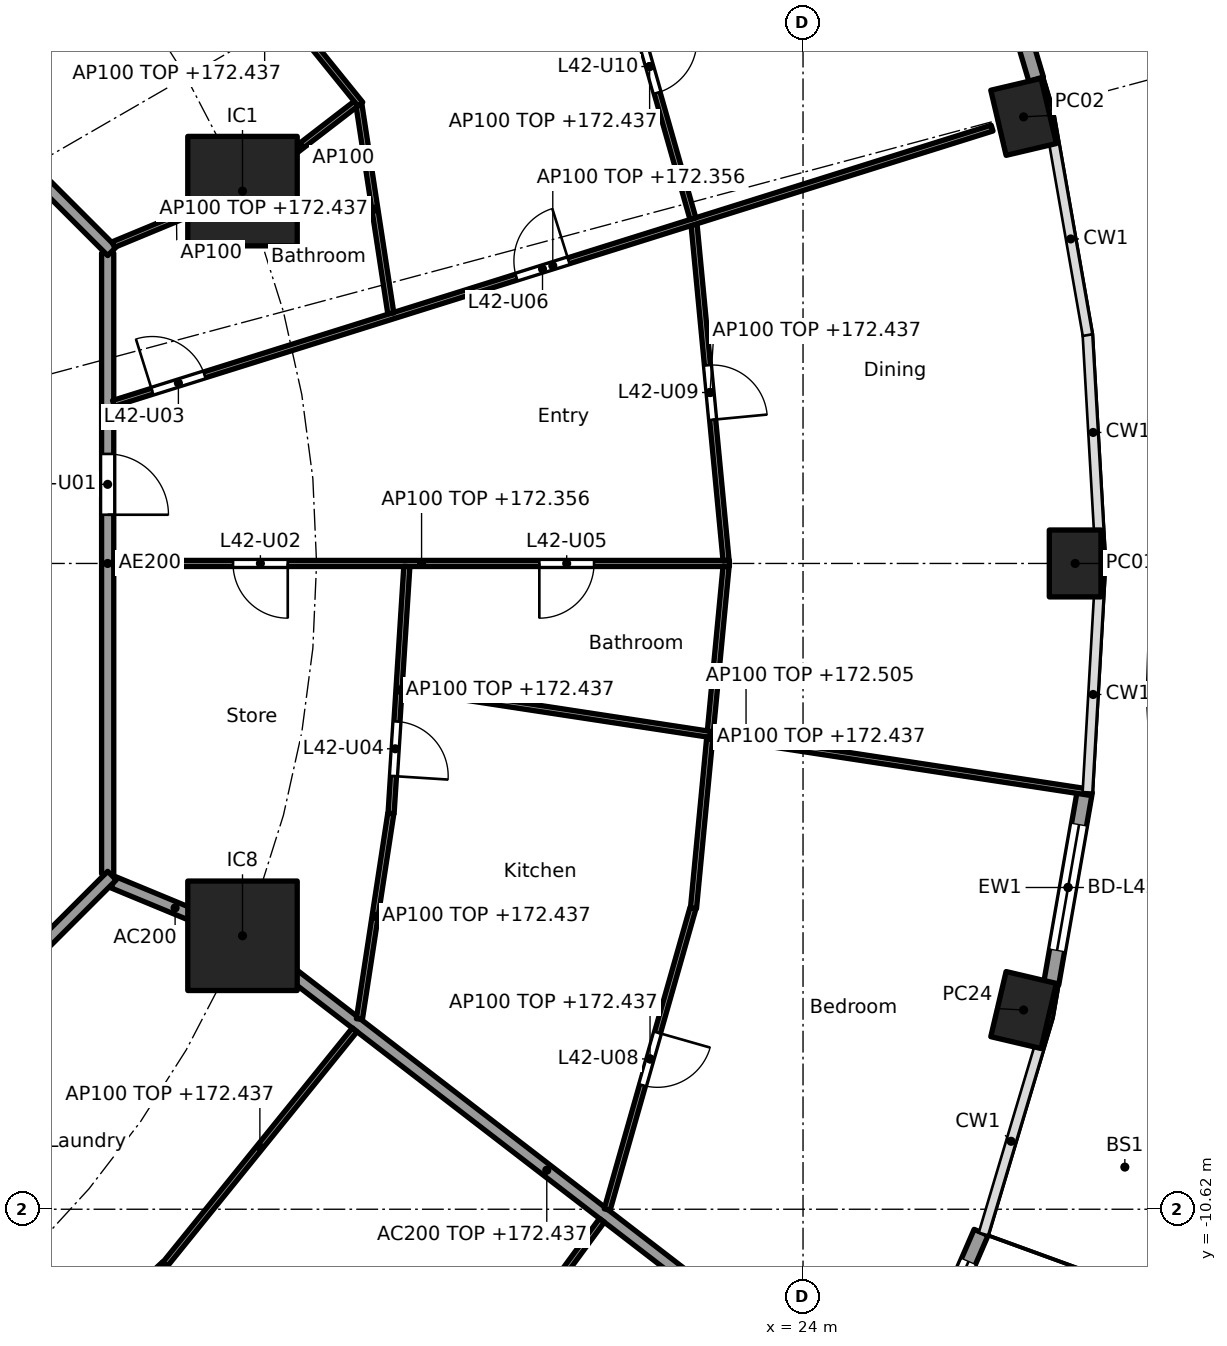
"""IFC4 building model, lengths in metres.
Left out: names, types, materials, properties, quantities, classifications, styles, units other than length and angle.
Written with IfcOpenShell. Run it as: python <this file> out.ifc"""

import sys

from ifc_helpers import new_model, si_unit, direction, frame, frame_2d, origin, origin_2d, place, context, subcontext, project, spatial, rectangle, hollow_rectangle, extrude, element, fill, save


model = new_model("IFC4")
c1 = context("Model", 3, precision=1e-05, world=origin(), true_north=direction((0.0, 1.0)))
c2 = subcontext(c1, "Body", "Model", "MODEL_VIEW")
j1 = project(units=[si_unit("LENGTHUNIT", "METRE"), si_unit("PLANEANGLEUNIT", "RADIAN")], contexts=[c1])
p1 = place(None, origin())
s1 = spatial("IfcSite", under=j1, at=p1, CompositionType="ELEMENT")
p2 = place(p1, origin())
s2 = spatial("IfcBuilding", under=s1, at=p2, CompositionType="ELEMENT")
p3 = place(p2, frame((0.0, 0.0, 169.6)))
s3 = spatial("IfcBuildingStorey", under=s2, at=p3, CompositionType="ELEMENT", Elevation=169.6)
for number, where, z_axis, x_axis in (
    (1, (28.475, 0.0, 0.0), (0.0, 0.0, 1.0), (0.0, 1.0, 0.0)),
    (2, (27.627, 7.344, 0.0), (0.0, 0.0, 1.0), (-0.229, 0.973, 0.0)),
    (3, (27.627, -7.344, 0.0), (0.0, 0.0, 1.0), (0.229, 0.973, 0.0)),
):
    element("IfcColumn", number, at=place(p3, frame(where, z_axis=z_axis, x_axis=x_axis)), inside=s3, PredefinedType="COLUMN", context=c2, shape_type="SweptSolid", body=[
        extrude(hollow_rectangle(XDim=1.1, YDim=0.85, WallThickness=0.036, at=origin_2d()), origin(), (0.0, 0.0, 1.0), 3.7),
    ])
for number, where, z_axis, x_axis in (
    (4, (14.782, 6.123, 0.0), (0.0, 0.0, 1.0), (1.0, 0.0, 0.0)),
    (5, (14.782, -6.123, 0.0), (0.0, 0.0, 1.0), (1.0, 0.0, 0.0)),
):
    element("IfcColumn", number, at=place(p3, frame(where, z_axis=z_axis, x_axis=x_axis)), inside=s3, PredefinedType="COLUMN", context=c2, shape_type="SweptSolid", body=[
        extrude(rectangle(XDim=1.8, YDim=1.8, at=origin_2d()), origin(), (0.0, 0.0, 1.0), 3.7),
    ])
p4 = place(p3, frame((26.924, 11.014, 0.0), z_axis=(0.0, 0.0, 1.0), x_axis=(0.28584838049, -0.958274857946, 0.0)))
e6 = element("IfcWall", 6, at=p4, inside=s3, PredefinedType="SOLIDWALL", context=c2, shape_type="SweptSolid", body=[
    extrude(rectangle(XDim=3.182, YDim=0.25, at=frame_2d((1.591, 0.0))), origin(), (0.0, 0.0, 1.0), 3.44),
])
p5 = place(p4, frame((0.541, 0.0, 0.0)))
e7 = element("IfcOpeningElement", 7, at=p5, cuts=e6, PredefinedType="OPENING", context=c2, shape_type="SweptSolid", body=[
    extrude(rectangle(XDim=2.1, YDim=2.4, at=frame_2d((1.05, 1.2))), frame((0.0, 0.135, 0.0), z_axis=(0.0, -1.0, 0.0), x_axis=(1.0, 0.0, 0.0)), (0.0, 0.0, 1.0), 0.27),
])
p6 = place(p3, frame((26.929, -11.0, 0.0), z_axis=(0.0, 0.0, 1.0), x_axis=(-0.397620521824, -0.917549955384, 0.0)))
e8 = element("IfcWall", 8, at=p6, inside=s3, PredefinedType="SOLIDWALL", context=c2, shape_type="SweptSolid", body=[
    extrude(rectangle(XDim=3.142, YDim=0.25, at=frame_2d((1.571, 0.0))), origin(), (0.0, 0.0, 1.0), 3.44),
])
p7 = place(p6, frame((0.521, 0.0, 0.0)))
e9 = element("IfcOpeningElement", 9, at=p7, cuts=e8, PredefinedType="OPENING", context=c2, shape_type="SweptSolid", body=[
    extrude(rectangle(XDim=2.1, YDim=2.4, at=frame_2d((1.05, 1.2))), frame((0.0, 0.135, 0.0), z_axis=(0.0, -1.0, 0.0), x_axis=(1.0, 0.0, 0.0)), (0.0, 0.0, 1.0), 0.27),
])
p8 = place(p3, frame((28.635, -3.747, 0.0), z_axis=(0.0, 0.0, 1.0), x_axis=(-0.172149769468, -0.985070787747, 0.0)))
e10 = element("IfcWall", 10, at=p8, inside=s3, PredefinedType="SOLIDWALL", context=c2, shape_type="SweptSolid", body=[
    extrude(rectangle(XDim=3.211, YDim=0.25, at=frame_2d((1.605, 0.0))), origin(), (0.0, 0.0, 1.0), 3.44),
])
p9 = place(p8, frame((0.555, 0.0, 0.0)))
e11 = element("IfcOpeningElement", 11, at=p9, cuts=e10, PredefinedType="OPENING", context=c2, shape_type="SweptSolid", body=[
    extrude(rectangle(XDim=2.1, YDim=2.4, at=frame_2d((1.05, 1.2))), frame((0.0, 0.135, 0.0), z_axis=(0.0, -1.0, 0.0), x_axis=(1.0, 0.0, 0.0)), (0.0, 0.0, 1.0), 0.27),
])
p10 = place(p3, frame((12.657, -5.243, 0.0), z_axis=(0.0, 0.0, 1.0), x_axis=(0.92383017907, -0.382802560388, 0.0)))
e12 = element("IfcWall", 12, at=p10, inside=s3, PredefinedType="PARTITIONING", context=c2, shape_type="SweptSolid", body=[
    extrude(rectangle(XDim=2.2, YDim=0.2, at=frame_2d((1.1, 0.0))), origin(), (0.0, 0.0, 1.0), 3.44),
])
p11 = place(p3, frame((14.822, -6.154, 0.0), z_axis=(0.0, 0.0, 1.0), x_axis=(0.792203056092, -0.610257583254, 0.0)))
e13 = element("IfcWall", 13, at=p11, inside=s3, PredefinedType="PARTITIONING", context=c2, shape_type="SweptSolid", body=[
    extrude(rectangle(XDim=12.533, YDim=0.2, at=frame_2d((6.266, 0.0))), origin(), (0.0, 0.0, 1.0), 2.837),
])
p12 = place(p3, frame((12.565, -5.104, 0.0), z_axis=(0.0, 0.0, 1.0), x_axis=(0.0, 1.0, 0.0)))
e14 = element("IfcWall", 14, at=p12, inside=s3, PredefinedType="PARTITIONING", context=c2, shape_type="SweptSolid", body=[
    extrude(rectangle(XDim=10.209, YDim=0.2, at=frame_2d((5.104, 0.0))), origin(), (0.0, 0.0, 1.0), 3.44),
])
p13 = place(p12, frame((5.906, 0.0, 0.0)))
e15 = element("IfcOpeningElement", 15, at=p13, cuts=e14, PredefinedType="OPENING", context=c2, shape_type="SweptSolid", body=[
    extrude(rectangle(XDim=1.0, YDim=2.1, at=frame_2d((0.5, 1.05))), frame((0.0, 0.11, 0.0), z_axis=(0.0, -1.0, 0.0), x_axis=(1.0, 0.0, 0.0)), (0.0, 0.0, 1.0), 0.22),
])
p14 = place(p3, frame((12.635, 5.134, 0.0), z_axis=(0.0, 0.0, 1.0), x_axis=(-0.707106781187, 0.707106781187, 0.0)))
e16 = element("IfcWall", 16, at=p14, inside=s3, PredefinedType="PARTITIONING", context=c2, shape_type="SweptSolid", body=[
    extrude(rectangle(XDim=10.609, YDim=0.2, at=frame_2d((5.305, 0.0))), origin(), (0.0, 0.0, 1.0), 3.44),
])
p15 = place(p3, frame((5.275, -12.494, 0.0), z_axis=(0.0, 0.0, 1.0), x_axis=(0.707106781187, 0.707106781187, 0.0)))
e17 = element("IfcWall", 17, at=p15, inside=s3, PredefinedType="PARTITIONING", context=c2, shape_type="SweptSolid", body=[
    extrude(rectangle(XDim=10.409, YDim=0.2, at=frame_2d((5.205, 0.0))), origin(), (0.0, 0.0, 1.0), 3.44),
])
p16 = place(p3, frame((12.665, 0.0, 0.0), z_axis=(0.0, 0.0, 1.0), x_axis=(1.0, 0.0, 0.0)))
e18 = element("IfcWall", 18, at=p16, inside=s3, PredefinedType="PARTITIONING", context=c2, shape_type="SweptSolid", body=[
    extrude(rectangle(XDim=10.124, YDim=0.1, at=frame_2d((5.062, 0.0))), origin(), (0.0, 0.0, 1.0), 2.756),
])
p17 = place(p16, frame((1.961, 0.0, 0.0)))
e19 = element("IfcOpeningElement", 19, at=p17, cuts=e18, PredefinedType="OPENING", context=c2, shape_type="SweptSolid", body=[
    extrude(rectangle(XDim=0.9, YDim=2.1, at=frame_2d((0.45, 1.05))), frame((0.0, 0.06, 0.0), z_axis=(0.0, -1.0, 0.0), x_axis=(1.0, 0.0, 0.0)), (0.0, 0.0, 1.0), 0.12),
])
p18 = place(p16, frame((6.999, 0.0, 0.0)))
e20 = element("IfcOpeningElement", 20, at=p18, cuts=e18, PredefinedType="OPENING", context=c2, shape_type="SweptSolid", body=[
    extrude(rectangle(XDim=0.9, YDim=2.1, at=frame_2d((0.45, 1.05))), frame((0.0, 0.06, 0.0), z_axis=(0.0, -1.0, 0.0), x_axis=(1.0, 0.0, 0.0)), (0.0, 0.0, 1.0), 0.12),
])
p19 = place(p3, frame((17.485, -0.05, 0.0), z_axis=(0.0, 0.0, 1.0), x_axis=(-0.063673473968, -0.997970785501, 0.0)))
e21 = element("IfcWall", 21, at=p19, inside=s3, PredefinedType="PARTITIONING", context=c2, shape_type="SweptSolid", body=[
    extrude(rectangle(XDim=4.072, YDim=0.1, at=frame_2d((2.036, 0.0))), origin(), (0.0, 0.0, 1.0), 2.837),
])
p20 = place(p19, frame((2.554, 0.0, 0.0)))
e22 = element("IfcOpeningElement", 22, at=p20, cuts=e21, PredefinedType="OPENING", context=c2, shape_type="SweptSolid", body=[
    extrude(rectangle(XDim=0.9, YDim=2.1, at=frame_2d((0.45, 1.05))), frame((0.0, 0.06, 0.0), z_axis=(0.0, -1.0, 0.0), x_axis=(1.0, 0.0, 0.0)), (0.0, 0.0, 1.0), 0.12),
])
p21 = place(p3, frame((22.734, 0.05, 0.0), z_axis=(0.0, 0.0, 1.0), x_axis=(-0.094923312677, 0.995484587882, 0.0)))
e23 = element("IfcWall", 23, at=p21, inside=s3, PredefinedType="PARTITIONING", context=c2, shape_type="SweptSolid", body=[
    extrude(rectangle(XDim=5.548, YDim=0.1, at=frame_2d((2.774, 0.0))), origin(), (0.0, 0.0, 1.0), 2.837),
])
p22 = place(p21, frame((2.324, 0.0, 0.0)))
e24 = element("IfcOpeningElement", 24, at=p22, cuts=e23, PredefinedType="OPENING", context=c2, shape_type="SweptSolid", body=[
    extrude(rectangle(XDim=0.9, YDim=2.1, at=frame_2d((0.45, 1.05))), frame((0.0, 0.06, 0.0), z_axis=(0.0, -1.0, 0.0), x_axis=(1.0, 0.0, 0.0)), (0.0, 0.0, 1.0), 0.12),
])
p23 = place(p3, frame((22.734, -0.05, 0.0), z_axis=(0.0, 0.0, 1.0), x_axis=(-0.0949274088, -0.995484197292, 0.0)))
e25 = element("IfcWall", 25, at=p23, inside=s3, PredefinedType="PARTITIONING", context=c2, shape_type="SweptSolid", body=[
    extrude(rectangle(XDim=5.648, YDim=0.1, at=frame_2d((2.824, 0.0))), origin(), (0.0, 0.0, 1.0), 2.837),
])
p24 = place(p3, frame((12.66, 2.632, 0.0), z_axis=(0.0, 0.0, 1.0), x_axis=(0.954248738607, 0.299013954302, 0.0)))
e26 = element("IfcWall", 26, at=p24, inside=s3, PredefinedType="PARTITIONING", context=c2, shape_type="SweptSolid", body=[
    extrude(rectangle(XDim=15.142, YDim=0.1, at=frame_2d((7.571, 0.0))), origin(), (0.0, 0.0, 1.0), 2.756),
])
p25 = place(p24, frame((0.669, 0.0, 0.0)))
e27 = element("IfcOpeningElement", 27, at=p25, cuts=e26, PredefinedType="OPENING", context=c2, shape_type="SweptSolid", body=[
    extrude(rectangle(XDim=0.9, YDim=2.1, at=frame_2d((0.45, 1.05))), frame((0.0, 0.06, 0.0), z_axis=(0.0, -1.0, 0.0), x_axis=(1.0, 0.0, 0.0)), (0.0, 0.0, 1.0), 0.12),
])
p26 = place(p24, frame((6.944, 0.0, 0.0)))
e28 = element("IfcOpeningElement", 28, at=p26, cuts=e26, PredefinedType="OPENING", context=c2, shape_type="SweptSolid", body=[
    extrude(rectangle(XDim=0.9, YDim=2.1, at=frame_2d((0.45, 1.05))), frame((0.0, 0.06, 0.0), z_axis=(0.0, -1.0, 0.0), x_axis=(1.0, 0.0, 0.0)), (0.0, 0.0, 1.0), 0.12),
])
p27 = place(p3, frame((17.221, 4.113, 0.0), z_axis=(0.0, 0.0, 1.0), x_axis=(-0.151078880423, 0.988521710379, 0.0)))
e29 = element("IfcWall", 29, at=p27, inside=s3, PredefinedType="PARTITIONING", context=c2, shape_type="SweptSolid", body=[
    extrude(rectangle(XDim=3.469, YDim=0.1, at=frame_2d((1.735, 0.0))), origin(), (0.0, 0.0, 1.0), 2.837),
])
p28 = place(p3, frame((22.189, 5.67, 0.0), z_axis=(0.0, 0.0, 1.0), x_axis=(-0.273815967041, 0.961782104322, 0.0)))
e30 = element("IfcWall", 30, at=p28, inside=s3, PredefinedType="PARTITIONING", context=c2, shape_type="SweptSolid", body=[
    extrude(rectangle(XDim=5.202, YDim=0.1, at=frame_2d((2.601, 0.0))), origin(), (0.0, 0.0, 1.0), 2.837),
])
p29 = place(p28, frame((2.151, 0.0, 0.0)))
e31 = element("IfcOpeningElement", 31, at=p29, cuts=e30, PredefinedType="OPENING", context=c2, shape_type="SweptSolid", body=[
    extrude(rectangle(XDim=0.9, YDim=2.1, at=frame_2d((0.45, 1.05))), frame((0.0, 0.06, 0.0), z_axis=(0.0, -1.0, 0.0), x_axis=(1.0, 0.0, 0.0)), (0.0, 0.0, 1.0), 0.12),
])
p30 = place(p3, frame((12.657, 5.243, 0.0), z_axis=(0.0, 0.0, 1.0), x_axis=(0.923826362943, 0.382811769845, 0.0)))
e32 = element("IfcWall", 32, at=p30, inside=s3, PredefinedType="PARTITIONING", context=c2, shape_type="SweptSolid", body=[
    extrude(rectangle(XDim=2.25, YDim=0.1, at=frame_2d((1.125, 0.0))), origin(), (0.0, 0.0, 1.0), 3.44),
])
p31 = place(p3, frame((14.822, 6.154, 0.0), z_axis=(0.0, 0.0, 1.0), x_axis=(0.792226528082, 0.610227111987, 0.0)))
e33 = element("IfcWall", 33, at=p31, inside=s3, PredefinedType="PARTITIONING", context=c2, shape_type="SweptSolid", body=[
    extrude(rectangle(XDim=2.307, YDim=0.1, at=frame_2d((1.154, 0.0))), origin(), (0.0, 0.0, 1.0), 3.44),
])
p32 = place(p3, frame((16.721, 7.553, 0.0), z_axis=(0.0, 0.0, 1.0), x_axis=(-0.628753513808, 0.777604667472, 0.0)))
e34 = element("IfcWall", 34, at=p32, inside=s3, PredefinedType="PARTITIONING", context=c2, shape_type="SweptSolid", body=[
    extrude(rectangle(XDim=5.007, YDim=0.1, at=frame_2d((2.504, 0.0))), origin(), (0.0, 0.0, 1.0), 2.837),
])
p33 = place(p32, frame((2.079, 0.0, 0.0)))
e35 = element("IfcOpeningElement", 35, at=p33, cuts=e34, PredefinedType="OPENING", context=c2, shape_type="SweptSolid", body=[
    extrude(rectangle(XDim=0.9, YDim=2.1, at=frame_2d((0.45, 1.05))), frame((0.0, 0.06, 0.0), z_axis=(0.0, -1.0, 0.0), x_axis=(1.0, 0.0, 0.0)), (0.0, 0.0, 1.0), 0.12),
])
p34 = place(p3, frame((10.21, -14.614, 0.0), z_axis=(0.0, 0.0, 1.0), x_axis=(0.728883199496, 0.684638066055, 0.0)))
e36 = element("IfcWall", 36, at=p34, inside=s3, PredefinedType="PARTITIONING", context=c2, shape_type="SweptSolid", body=[
    extrude(rectangle(XDim=4.519, YDim=0.1, at=frame_2d((2.26, 0.0))), origin(), (0.0, 0.0, 1.0), 2.837),
])
p35 = place(p3, frame((8.943, -8.966, 0.0), z_axis=(0.0, 0.0, 1.0), x_axis=(0.586803608919, -0.809729290912, 0.0)))
e37 = element("IfcWall", 37, at=p35, inside=s3, PredefinedType="PARTITIONING", context=c2, shape_type="SweptSolid", body=[
    extrude(rectangle(XDim=17.179, YDim=0.1, at=frame_2d((8.589, 0.0))), origin(), (0.0, 0.0, 1.0), 2.756),
])
p36 = place(p35, frame((2.062, 0.0, 0.0)))
e38 = element("IfcOpeningElement", 38, at=p36, cuts=e37, PredefinedType="OPENING", context=c2, shape_type="SweptSolid", body=[
    extrude(rectangle(XDim=0.9, YDim=2.1, at=frame_2d((0.45, 1.05))), frame((0.0, 0.06, 0.0), z_axis=(0.0, -1.0, 0.0), x_axis=(1.0, 0.0, 0.0)), (0.0, 0.0, 1.0), 0.12),
])
p37 = place(p35, frame((7.308, 0.0, 0.0)))
e39 = element("IfcOpeningElement", 39, at=p37, cuts=e37, PredefinedType="OPENING", context=c2, shape_type="SweptSolid", body=[
    extrude(rectangle(XDim=0.9, YDim=2.1, at=frame_2d((0.45, 1.05))), frame((0.0, 0.06, 0.0), z_axis=(0.0, -1.0, 0.0), x_axis=(1.0, 0.0, 0.0)), (0.0, 0.0, 1.0), 0.12),
])
p38 = place(p3, frame((13.509, -11.525, 0.0), z_axis=(0.0, 0.0, 1.0), x_axis=(0.628764602857, 0.777595700987, 0.0)))
e40 = element("IfcWall", 40, at=p38, inside=s3, PredefinedType="PARTITIONING", context=c2, shape_type="SweptSolid", body=[
    extrude(rectangle(XDim=4.957, YDim=0.1, at=frame_2d((2.479, 0.0))), origin(), (0.0, 0.0, 1.0), 2.837),
])
p39 = place(p3, frame((17.169, -15.609, 0.0), z_axis=(0.0, 0.0, 1.0), x_axis=(0.591122127251, 0.806582066918, 0.0)))
e41 = element("IfcWall", 41, at=p39, inside=s3, PredefinedType="PARTITIONING", context=c2, shape_type="SweptSolid", body=[
    extrude(rectangle(XDim=5.96, YDim=0.1, at=frame_2d((2.98, 0.0))), origin(), (0.0, 0.0, 1.0), 2.837),
])
p40 = place(p39, frame((2.555, 0.0, 0.0)))
e42 = element("IfcOpeningElement", 42, at=p40, cuts=e41, PredefinedType="OPENING", context=c2, shape_type="SweptSolid", body=[
    extrude(rectangle(XDim=0.9, YDim=2.1, at=frame_2d((0.45, 1.05))), frame((0.0, 0.06, 0.0), z_axis=(0.0, -1.0, 0.0), x_axis=(1.0, 0.0, 0.0)), (0.0, 0.0, 1.0), 0.12),
])
p41 = place(p3, frame((16.704, -7.493, 0.0), z_axis=(0.0, 0.0, 1.0), x_axis=(0.1510806336, 0.988521442434, 0.0)))
e43 = element("IfcWall", 43, at=p41, inside=s3, PredefinedType="PARTITIONING", context=c2, shape_type="SweptSolid", body=[
    extrude(rectangle(XDim=3.419, YDim=0.1, at=frame_2d((1.71, 0.0))), origin(), (0.0, 0.0, 1.0), 2.837),
])
p42 = place(p3, frame((20.779, -10.625, 0.0), z_axis=(0.0, 0.0, 1.0), x_axis=(0.273819702124, 0.961781040949, 0.0)))
e44 = element("IfcWall", 44, at=p42, inside=s3, PredefinedType="PARTITIONING", context=c2, shape_type="SweptSolid", body=[
    extrude(rectangle(XDim=5.152, YDim=0.1, at=frame_2d((2.576, 0.0))), origin(), (0.0, 0.0, 1.0), 2.837),
])
p43 = place(p42, frame((2.126, 0.0, 0.0)))
e45 = element("IfcOpeningElement", 45, at=p43, cuts=e44, PredefinedType="OPENING", context=c2, shape_type="SweptSolid", body=[
    extrude(rectangle(XDim=0.9, YDim=2.1, at=frame_2d((0.45, 1.05))), frame((0.0, 0.06, 0.0), z_axis=(0.0, -1.0, 0.0), x_axis=(1.0, 0.0, 0.0)), (0.0, 0.0, 1.0), 0.12),
])
p44 = place(p3, frame((17.407, -2.039, 0.0), z_axis=(0.0, 0.0, 1.0), x_axis=(0.98858728603, -0.150649188184, 0.0)))
e46 = element("IfcWall", 46, at=p44, inside=s3, PredefinedType="PARTITIONING", context=c2, shape_type="SweptSolid", body=[
    extrude(rectangle(XDim=11.441, YDim=0.1, at=frame_2d((5.721, 0.0))), origin(), (0.0, 0.0, 1.0), 2.905),
])
p45 = place(p7, origin())
e47 = element("IfcDoor", 47, at=p45, inside=s3, OperationType="SLIDING_TO_LEFT", PredefinedType="DOOR", context=c2, shape_type="SweptSolid", body=[
    extrude(rectangle(XDim=2.1, YDim=2.4, at=frame_2d((1.05, 1.2))), frame((0.0, 0.025, 0.0), z_axis=(0.0, -1.0, 0.0), x_axis=(1.0, 0.0, 0.0)), (0.0, 0.0, 1.0), 0.05),
])
fill(e9, e47)
p46 = place(p9, origin())
e48 = element("IfcDoor", 48, at=p46, inside=s3, OperationType="SLIDING_TO_LEFT", PredefinedType="DOOR", context=c2, shape_type="SweptSolid", body=[
    extrude(rectangle(XDim=2.1, YDim=2.4, at=frame_2d((1.05, 1.2))), frame((0.0, 0.025, 0.0), z_axis=(0.0, -1.0, 0.0), x_axis=(1.0, 0.0, 0.0)), (0.0, 0.0, 1.0), 0.05),
])
fill(e11, e48)
p47 = place(p13, frame((1.0, 0.0, 0.0), x_axis=(-1.0, 0.0, 0.0)))
e49 = element("IfcDoor", 49, at=p47, inside=s3, OperationType="SINGLE_SWING_RIGHT", PredefinedType="DOOR", context=c2, shape_type="SweptSolid", body=[
    extrude(rectangle(XDim=1.0, YDim=2.1, at=frame_2d((0.5, 1.05))), frame((0.0, 0.025, 0.0), z_axis=(0.0, -1.0, 0.0), x_axis=(1.0, 0.0, 0.0)), (0.0, 0.0, 1.0), 0.05),
])
fill(e15, e49)
p48 = place(p17, frame((0.9, 0.0, 0.0), x_axis=(-1.0, 0.0, 0.0)))
e50 = element("IfcDoor", 50, at=p48, inside=s3, OperationType="SINGLE_SWING_LEFT", PredefinedType="DOOR", context=c2, shape_type="SweptSolid", body=[
    extrude(rectangle(XDim=0.9, YDim=2.1, at=frame_2d((0.45, 1.05))), frame((0.0, 0.025, 0.0), z_axis=(0.0, -1.0, 0.0), x_axis=(1.0, 0.0, 0.0)), (0.0, 0.0, 1.0), 0.05),
])
fill(e19, e50)
p49 = place(p25, origin())
e51 = element("IfcDoor", 51, at=p49, inside=s3, OperationType="SINGLE_SWING_LEFT", PredefinedType="DOOR", context=c2, shape_type="SweptSolid", body=[
    extrude(rectangle(XDim=0.9, YDim=2.1, at=frame_2d((0.45, 1.05))), frame((0.0, 0.025, 0.0), z_axis=(0.0, -1.0, 0.0), x_axis=(1.0, 0.0, 0.0)), (0.0, 0.0, 1.0), 0.05),
])
fill(e27, e51)
p50 = place(p20, origin())
e52 = element("IfcDoor", 52, at=p50, inside=s3, OperationType="SINGLE_SWING_RIGHT", PredefinedType="DOOR", context=c2, shape_type="SweptSolid", body=[
    extrude(rectangle(XDim=0.9, YDim=2.1, at=frame_2d((0.45, 1.05))), frame((0.0, 0.025, 0.0), z_axis=(0.0, -1.0, 0.0), x_axis=(1.0, 0.0, 0.0)), (0.0, 0.0, 1.0), 0.05),
])
fill(e22, e52)
p51 = place(p18, frame((0.9, 0.0, 0.0), x_axis=(-1.0, 0.0, 0.0)))
e53 = element("IfcDoor", 53, at=p51, inside=s3, OperationType="SINGLE_SWING_RIGHT", PredefinedType="DOOR", context=c2, shape_type="SweptSolid", body=[
    extrude(rectangle(XDim=0.9, YDim=2.1, at=frame_2d((0.45, 1.05))), frame((0.0, 0.025, 0.0), z_axis=(0.0, -1.0, 0.0), x_axis=(1.0, 0.0, 0.0)), (0.0, 0.0, 1.0), 0.05),
])
fill(e20, e53)
p52 = place(p26, origin())
e54 = element("IfcDoor", 54, at=p52, inside=s3, OperationType="SINGLE_SWING_RIGHT", PredefinedType="DOOR", context=c2, shape_type="SweptSolid", body=[
    extrude(rectangle(XDim=0.9, YDim=2.1, at=frame_2d((0.45, 1.05))), frame((0.0, 0.025, 0.0), z_axis=(0.0, -1.0, 0.0), x_axis=(1.0, 0.0, 0.0)), (0.0, 0.0, 1.0), 0.05),
])
fill(e28, e54)
p53 = place(p43, frame((0.9, 0.0, 0.0), x_axis=(-1.0, 0.0, 0.0)))
e55 = element("IfcDoor", 55, at=p53, inside=s3, OperationType="SINGLE_SWING_LEFT", PredefinedType="DOOR", context=c2, shape_type="SweptSolid", body=[
    extrude(rectangle(XDim=0.9, YDim=2.1, at=frame_2d((0.45, 1.05))), frame((0.0, 0.025, 0.0), z_axis=(0.0, -1.0, 0.0), x_axis=(1.0, 0.0, 0.0)), (0.0, 0.0, 1.0), 0.05),
])
fill(e45, e55)
p54 = place(p22, frame((0.9, 0.0, 0.0), x_axis=(-1.0, 0.0, 0.0)))
e56 = element("IfcDoor", 56, at=p54, inside=s3, OperationType="SINGLE_SWING_RIGHT", PredefinedType="DOOR", context=c2, shape_type="SweptSolid", body=[
    extrude(rectangle(XDim=0.9, YDim=2.1, at=frame_2d((0.45, 1.05))), frame((0.0, 0.025, 0.0), z_axis=(0.0, -1.0, 0.0), x_axis=(1.0, 0.0, 0.0)), (0.0, 0.0, 1.0), 0.05),
])
fill(e24, e56)
p55 = place(p29, frame((0.9, 0.0, 0.0), x_axis=(-1.0, 0.0, 0.0)))
e57 = element("IfcDoor", 57, at=p55, inside=s3, OperationType="SINGLE_SWING_LEFT", PredefinedType="DOOR", context=c2, shape_type="SweptSolid", body=[
    extrude(rectangle(XDim=0.9, YDim=2.1, at=frame_2d((0.45, 1.05))), frame((0.0, 0.025, 0.0), z_axis=(0.0, -1.0, 0.0), x_axis=(1.0, 0.0, 0.0)), (0.0, 0.0, 1.0), 0.05),
])
fill(e31, e57)
save(model, sys.argv[1])
